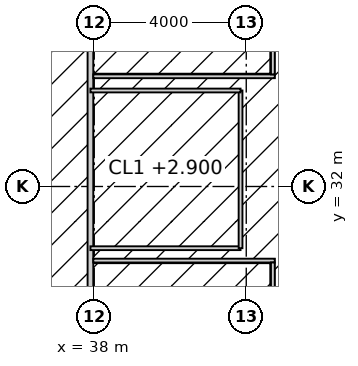
"""IFC4 building model, lengths in metres.
Left out: names, types, materials, properties, quantities, classifications, styles, units other than length and angle.
Written with IfcOpenShell. Run it as: python <this file> out.ifc"""

import sys

from ifc_helpers import new_model, si_unit, direction, frame, frame_2d, origin, place, context, subcontext, project, spatial, rectangle, extrude, element, fill, save


model = new_model("IFC4")
c1 = context("Model", 3, precision=1e-05, world=origin(), true_north=direction((0.0, 1.0)))
c2 = subcontext(c1, "Body", "Model", "MODEL_VIEW")
j1 = project(units=[si_unit("LENGTHUNIT", "METRE"), si_unit("PLANEANGLEUNIT", "RADIAN")], contexts=[c1])
p1 = place(None, origin())
s1 = spatial("IfcSite", under=j1, at=p1, CompositionType="ELEMENT")
p2 = place(p1, origin())
s2 = spatial("IfcBuilding", under=s1, at=p2, CompositionType="ELEMENT")
p3 = place(p2, frame((0.0, 0.0, 121.4)))
s3 = spatial("IfcBuildingStorey", under=s2, at=p3, CompositionType="ELEMENT", Elevation=121.4)
p4 = place(p3, frame((37.9, 15.625, 0.0), z_axis=(0.0, 0.0, 1.0), x_axis=(0.0, 1.0, 0.0)))
e1 = element("IfcWall", 1, at=p4, inside=s3, PredefinedType="PARTITIONING", context=c2, shape_type="SweptSolid", body=[
    extrude(rectangle(XDim=22.75, YDim=0.15, at=frame_2d((11.375, 0.0))), origin(), (0.0, 0.0, 1.0), 2.95),
])
p5 = place(p4, frame((4.974, 0.0, 0.0)))
e2 = element("IfcOpeningElement", 2, at=p5, cuts=e1, PredefinedType="OPENING", context=c2, shape_type="SweptSolid", body=[
    extrude(rectangle(XDim=1.8, YDim=2.4, at=frame_2d((0.9, 1.2))), frame((0.0, 0.085, 0.0), z_axis=(0.0, -1.0, 0.0), x_axis=(1.0, 0.0, 0.0)), (0.0, 0.0, 1.0), 0.17),
])
p6 = place(p4, frame((16.226, 0.0, 0.0)))
e3 = element("IfcOpeningElement", 3, at=p6, cuts=e1, PredefinedType="OPENING", context=c2, shape_type="SweptSolid", body=[
    extrude(rectangle(XDim=1.8, YDim=2.4, at=frame_2d((0.9, 1.2))), frame((0.0, 0.085, 0.0), z_axis=(0.0, -1.0, 0.0), x_axis=(1.0, 0.0, 0.0)), (0.0, 0.0, 1.0), 0.17),
])
for number, where, z_axis, x_axis in (
    (4, (37.975, 30.05, 0.0), (0.0, 0.0, 1.0), (1.0, 0.0, 0.0)),
    (5, (37.975, 34.9, 0.0), (0.0, 0.0, 1.0), (1.0, 0.0, 0.0)),
):
    element("IfcWall", number, at=place(p3, frame(where, z_axis=z_axis, x_axis=x_axis)), inside=s3, PredefinedType="PARTITIONING", context=c2, shape_type="SweptSolid", body=[
        extrude(rectangle(XDim=4.775, YDim=0.1, at=frame_2d((2.387, 0.0))), origin(), (0.0, 0.0, 1.0), 3.85),
    ])
p7 = place(p3, frame((42.7, 27.45, 0.0), z_axis=(0.0, 0.0, 1.0), x_axis=(0.0, 1.0, 0.0)))
e6 = element("IfcWall", 6, at=p7, inside=s3, PredefinedType="PARTITIONING", context=c2, shape_type="SweptSolid", body=[
    extrude(rectangle(XDim=2.55, YDim=0.1, at=frame_2d((1.275, 0.0))), origin(), (0.0, 0.0, 1.0), 3.85),
])
p8 = place(p7, frame((0.775, 0.0, 0.0)))
e7 = element("IfcOpeningElement", 7, at=p8, cuts=e6, PredefinedType="OPENING", context=c2, shape_type="SweptSolid", body=[
    extrude(rectangle(XDim=1.0, YDim=2.2, at=frame_2d((0.5, 1.1))), frame((0.0, 0.06, 0.0), z_axis=(0.0, -1.0, 0.0), x_axis=(1.0, 0.0, 0.0)), (0.0, 0.0, 1.0), 0.12),
])
p9 = place(p3, frame((42.7, 34.95, 0.0), z_axis=(0.0, 0.0, 1.0), x_axis=(0.0, 1.0, 0.0)))
e8 = element("IfcWall", 8, at=p9, inside=s3, PredefinedType="PARTITIONING", context=c2, shape_type="SweptSolid", body=[
    extrude(rectangle(XDim=3.3, YDim=0.1, at=frame_2d((1.65, 0.0))), origin(), (0.0, 0.0, 1.0), 3.85),
])
p10 = place(p9, frame((1.15, 0.0, 0.0)))
e9 = element("IfcOpeningElement", 9, at=p10, cuts=e8, PredefinedType="OPENING", context=c2, shape_type="SweptSolid", body=[
    extrude(rectangle(XDim=1.0, YDim=2.2, at=frame_2d((0.5, 1.1))), frame((0.0, 0.06, 0.0), z_axis=(0.0, -1.0, 0.0), x_axis=(1.0, 0.0, 0.0)), (0.0, 0.0, 1.0), 0.12),
])
p11 = place(p3, frame((37.9, 30.376, 0.0), z_axis=(0.0, 0.0, 1.0), x_axis=(1.0, 0.0, 0.0)))
e10 = element("IfcWall", 10, at=p11, inside=s3, PredefinedType="PARTITIONING", context=c2, shape_type="SweptSolid", body=[
    extrude(rectangle(XDim=3.95, YDim=0.1, at=frame_2d((1.975, 0.0))), origin(), (0.0, 0.0, 1.0), 3.85),
])
p12 = place(p3, frame((41.85, 30.376, 0.0), z_axis=(0.0, 0.0, 1.0), x_axis=(0.0, 1.0, 0.0)))
e11 = element("IfcWall", 11, at=p12, inside=s3, PredefinedType="PARTITIONING", context=c2, shape_type="SweptSolid", body=[
    extrude(rectangle(XDim=4.15, YDim=0.1, at=frame_2d((2.075, 0.0))), origin(), (0.0, 0.0, 1.0), 3.85),
])
p13 = place(p12, frame((1.575, 0.0, 0.0)))
e12 = element("IfcOpeningElement", 12, at=p13, cuts=e11, PredefinedType="OPENING", context=c2, shape_type="SweptSolid", body=[
    extrude(rectangle(XDim=1.0, YDim=2.2, at=frame_2d((0.5, 1.1))), frame((0.0, 0.06, 0.0), z_axis=(0.0, -1.0, 0.0), x_axis=(1.0, 0.0, 0.0)), (0.0, 0.0, 1.0), 0.12),
])
p14 = place(p3, frame((41.85, 34.526, 0.0), z_axis=(0.0, 0.0, 1.0), x_axis=(-1.0, 0.0, 0.0)))
e13 = element("IfcWall", 13, at=p14, inside=s3, PredefinedType="PARTITIONING", context=c2, shape_type="SweptSolid", body=[
    extrude(rectangle(XDim=3.95, YDim=0.1, at=frame_2d((1.975, 0.0))), origin(), (0.0, 0.0, 1.0), 3.85),
])
p15 = place(p6, origin())
e14 = element("IfcDoor", 14, at=p15, inside=s3, OperationType="DOUBLE_DOOR_DOUBLE_SWING", PredefinedType="DOOR", context=c2, shape_type="SweptSolid", body=[
    extrude(rectangle(XDim=1.8, YDim=2.4, at=frame_2d((0.9, 1.2))), frame((0.0, 0.025, 0.0), z_axis=(0.0, -1.0, 0.0), x_axis=(1.0, 0.0, 0.0)), (0.0, 0.0, 1.0), 0.05),
])
fill(e3, e14)
p16 = place(p13, origin())
e15 = element("IfcDoor", 15, at=p16, inside=s3, OperationType="SINGLE_SWING_RIGHT", PredefinedType="DOOR", context=c2, shape_type="SweptSolid", body=[
    extrude(rectangle(XDim=1.0, YDim=2.2, at=frame_2d((0.5, 1.1))), frame((0.0, 0.025, 0.0), z_axis=(0.0, -1.0, 0.0), x_axis=(1.0, 0.0, 0.0)), (0.0, 0.0, 1.0), 0.05),
])
fill(e12, e15)
save(model, sys.argv[1])
